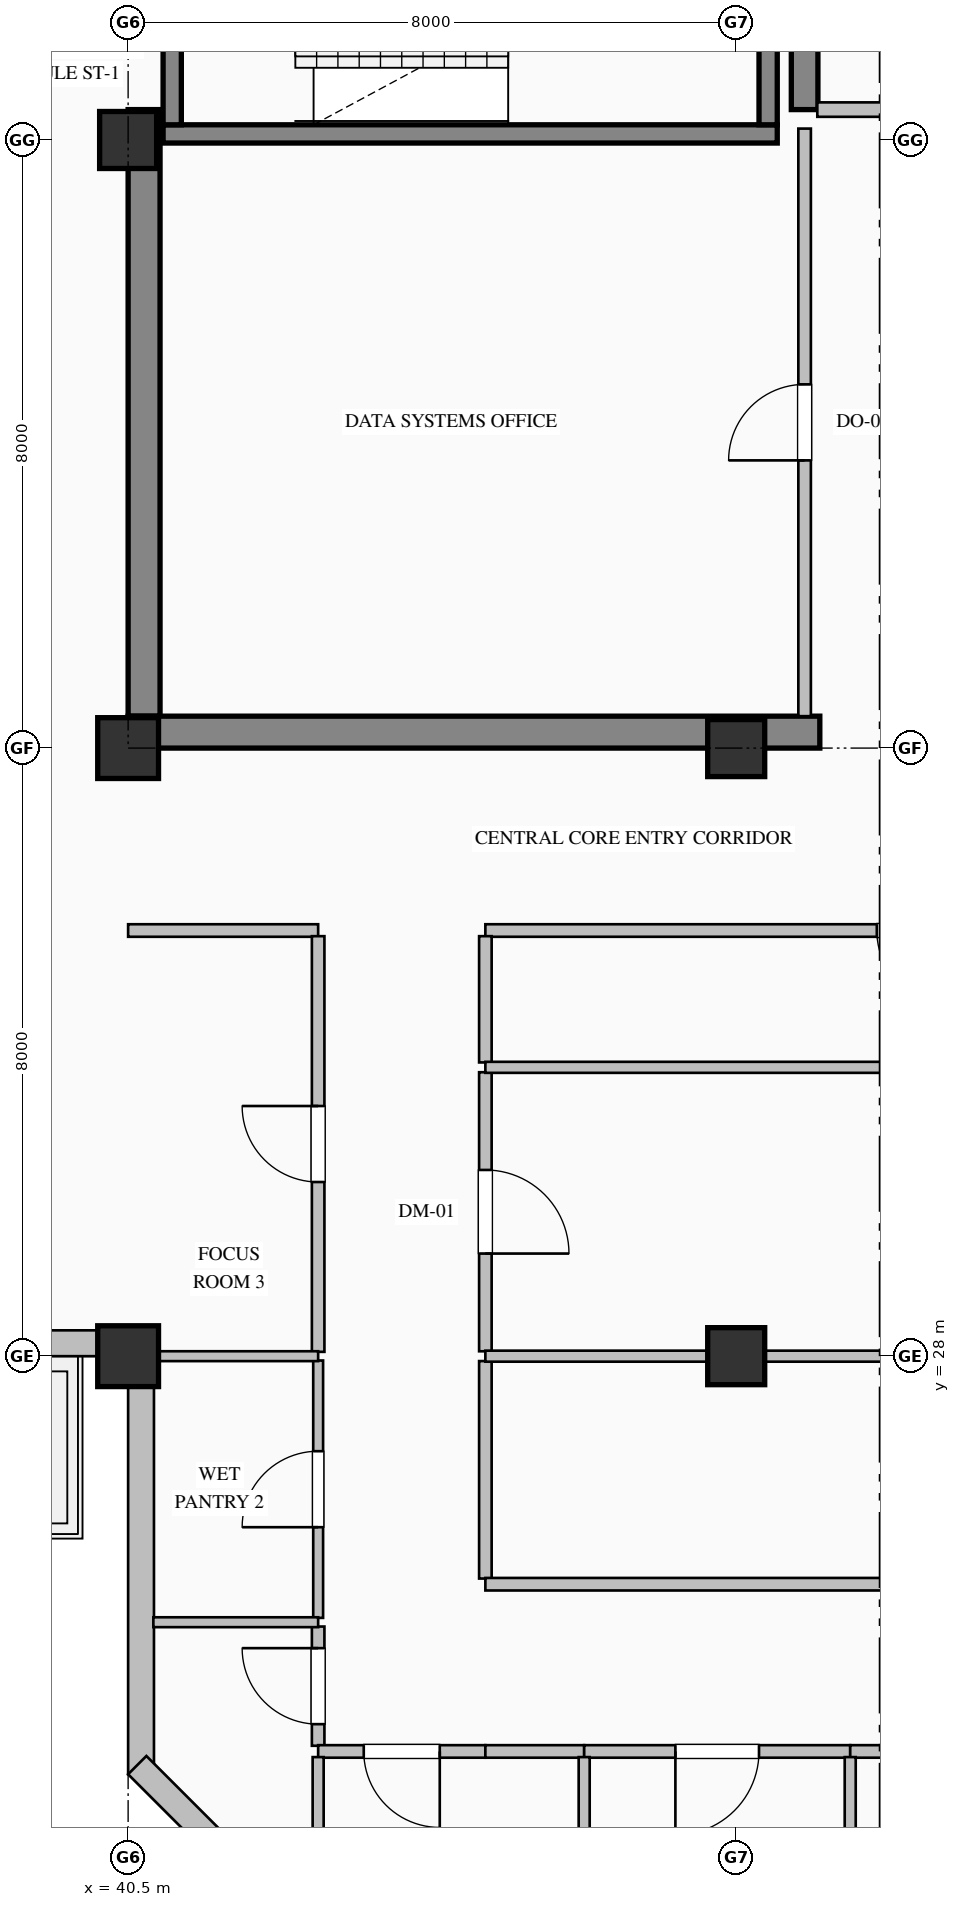
"""IFC4 building model, lengths in metres.
Left out: names, types, materials, properties, quantities, classifications, styles, units other than length and angle.
Written with IfcOpenShell. Run it as: python <this file> out.ifc"""

import sys

from ifc_helpers import new_model, si_unit, direction, frame, frame_2d, origin, origin_2d, place, context, subcontext, project, spatial, rectangle, hollow_rectangle, extrude, element, fill, save


model = new_model("IFC4")
c1 = context("Model", 3, precision=1e-05, world=origin(), true_north=direction((0.0, 1.0)))
c2 = subcontext(c1, "Body", "Model", "MODEL_VIEW")
j1 = project(units=[si_unit("LENGTHUNIT", "METRE"), si_unit("PLANEANGLEUNIT", "RADIAN")], contexts=[c1])
p1 = place(None, origin())
s1 = spatial("IfcSite", under=j1, at=p1, CompositionType="ELEMENT")
p2 = place(p1, origin())
s2 = spatial("IfcBuilding", under=s1, at=p2, CompositionType="ELEMENT")
p3 = place(p2, frame((0.0, 0.0, 291.2)))
s3 = spatial("IfcBuildingStorey", under=s2, at=p3, CompositionType="ELEMENT", Elevation=291.2)
p4 = place(p3, frame((40.71, 36.42, 0.0), z_axis=(0.0, 0.0, 1.0), x_axis=(0.0, 1.0, 0.0)))
e1 = element("IfcWall", 1, at=p4, inside=s3, PredefinedType="SHEAR", context=c2, shape_type="SweptSolid", body=[
    extrude(rectangle(XDim=7.98, YDim=0.42, at=frame_2d((3.99, 0.0))), origin(), (0.0, 0.0, 1.0), 3.785),
])
p5 = place(p3, frame((40.5, 36.21, 0.0), z_axis=(0.0, 0.0, 1.0), x_axis=(1.0, 0.0, 0.0)))
e2 = element("IfcWall", 2, at=p5, inside=s3, PredefinedType="SHEAR", context=c2, shape_type="SweptSolid", body=[
    extrude(rectangle(XDim=9.1, YDim=0.42, at=frame_2d((4.55, 0.0))), origin(), (0.0, 0.0, 1.0), 3.785),
])
p6 = place(p3, frame((49.4, 44.4, 0.0), z_axis=(0.0, 0.0, 1.0), x_axis=(0.0, 1.0, 0.0)))
e3 = element("IfcWall", 3, at=p6, inside=s3, PredefinedType="SHEAR", context=c2, shape_type="SweptSolid", body=[
    extrude(rectangle(XDim=3.0, YDim=0.35, at=frame_2d((1.5, 0.0))), origin(), (0.0, 0.0, 1.0), 3.785),
])
for number, where, z_axis, x_axis in (
    (4, (40.5, 28.0, 0.0), (0.0, 0.0, 1.0), (1.0, 0.0, 0.0)),
    (5, (40.5, 36.0, 0.0), (0.0, 0.0, 1.0), (1.0, 0.0, 0.0)),
):
    element("IfcColumn", number, at=place(p3, frame(where, z_axis=z_axis, x_axis=x_axis)), inside=s3, PredefinedType="COLUMN", context=c2, shape_type="SweptSolid", body=[
        extrude(hollow_rectangle(XDim=0.8, YDim=0.8, WallThickness=0.032, at=origin_2d()), origin(), (0.0, 0.0, 1.0), 4.0),
    ])
for number, where, z_axis, x_axis in (
    (6, (40.5, 44.0, 0.0), (0.0, 0.0, 1.0), (1.0, 0.0, 0.0)),
    (7, (48.5, 28.0, 0.0), (0.0, 0.0, 1.0), (1.0, 0.0, 0.0)),
    (8, (48.5, 36.0, 0.0), (0.0, 0.0, 1.0), (1.0, 0.0, 0.0)),
):
    element("IfcColumn", number, at=place(p3, frame(where, z_axis=z_axis, x_axis=x_axis)), inside=s3, PredefinedType="COLUMN", context=c2, shape_type="SweptSolid", body=[
        extrude(rectangle(XDim=0.75, YDim=0.75, at=origin_2d()), origin(), (0.0, 0.0, 1.0), 4.0),
    ])
p7 = place(p3, frame((40.67, 22.5, 0.0), z_axis=(0.0, 0.0, 1.0), x_axis=(0.0, 1.0, 0.0)))
e9 = element("IfcWall", 9, at=p7, inside=s3, PredefinedType="SOLIDWALL", context=c2, shape_type="SweptSolid", body=[
    extrude(rectangle(XDim=5.84, YDim=0.34, at=frame_2d((2.92, 0.0))), origin(), (0.0, 0.0, 1.0), 3.185),
])
p8 = place(p3, frame((40.52, 28.17, 0.0), z_axis=(0.0, 0.0, 1.0), x_axis=(-1.0, 0.0, 0.0)))
e10 = element("IfcWall", 10, at=p8, inside=s3, PredefinedType="SOLIDWALL", context=c2, shape_type="SweptSolid", body=[
    extrude(rectangle(XDim=20.02, YDim=0.34, at=frame_2d((10.01, 0.0))), origin(), (0.0, 0.0, 1.0), 3.185),
])
p9 = place(p8, frame((2.925, 0.0, 0.9)))
e11 = element("IfcOpeningElement", 11, at=p9, cuts=e10, PredefinedType="OPENING", context=c2, shape_type="SweptSolid", body=[
    extrude(rectangle(XDim=1.35, YDim=1.85, at=frame_2d((0.675, 0.925))), frame((0.0, 0.18, 0.0), z_axis=(0.0, -1.0, 0.0), x_axis=(1.0, 0.0, 0.0)), (0.0, 0.0, 1.0), 0.36),
])
p10 = place(p8, frame((13.725, 0.0, 0.9)))
e12 = element("IfcOpeningElement", 12, at=p10, cuts=e10, PredefinedType="OPENING", context=c2, shape_type="SweptSolid", body=[
    extrude(rectangle(XDim=1.35, YDim=1.85, at=frame_2d((0.675, 0.925))), frame((0.0, 0.18, 0.0), z_axis=(0.0, -1.0, 0.0), x_axis=(1.0, 0.0, 0.0)), (0.0, 0.0, 1.0), 0.36),
])
p11 = place(p8, frame((11.395, 0.0, 0.0)))
e13 = element("IfcOpeningElement", 13, at=p11, cuts=e10, PredefinedType="OPENING", context=c2, shape_type="SweptSolid", body=[
    extrude(rectangle(XDim=1.25, YDim=2.25, at=frame_2d((0.625, 1.125))), frame((0.0, 0.18, 0.0), z_axis=(0.0, -1.0, 0.0), x_axis=(1.0, 0.0, 0.0)), (0.0, 0.0, 1.0), 0.36),
])
p12 = place(p3, frame((44.62, 18.62, 0.0), z_axis=(0.0, 0.0, 1.0), x_axis=(-0.707106781187, 0.707106781187, 0.0)))
e14 = element("IfcWall", 14, at=p12, inside=s3, PredefinedType="SOLIDWALL", context=c2, shape_type="SweptSolid", body=[
    extrude(rectangle(XDim=5.657, YDim=0.34, at=frame_2d((2.828, 0.0))), origin(), (0.0, 0.0, 1.0), 3.785),
])
p13 = place(p3, frame((49.04, 44.08, 0.0), z_axis=(0.0, 0.0, 1.0), x_axis=(-1.0, 0.0, 0.0)))
e15 = element("IfcWall", 15, at=p13, inside=s3, PredefinedType="SOLIDWALL", context=c2, shape_type="SweptSolid", body=[
    extrude(rectangle(XDim=8.08, YDim=0.24, at=frame_2d((4.04, 0.0))), origin(), (0.0, 0.0, 1.0), 4.0),
])
p14 = place(p3, frame((41.08, 47.35, 0.0), z_axis=(0.0, 0.0, 1.0), x_axis=(0.0, -1.0, 0.0)))
e16 = element("IfcWall", 16, at=p14, inside=s3, PredefinedType="SOLIDWALL", context=c2, shape_type="SweptSolid", body=[
    extrude(rectangle(XDim=3.15, YDim=0.24, at=frame_2d((1.575, 0.0))), origin(), (0.0, 0.0, 1.0), 4.0),
])
p15 = place(p14, frame((1.0, 0.0, 0.0)))
e17 = element("IfcOpeningElement", 17, at=p15, cuts=e16, PredefinedType="OPENING", context=c2, shape_type="SweptSolid", body=[
    extrude(rectangle(XDim=1.15, YDim=2.2, at=frame_2d((0.575, 1.1))), frame((0.0, 0.13, 0.0), z_axis=(0.0, -1.0, 0.0), x_axis=(1.0, 0.0, 0.0)), (0.0, 0.0, 1.0), 0.26),
])
p16 = place(p3, frame((48.92, 44.2, 0.0), z_axis=(0.0, 0.0, 1.0), x_axis=(0.0, 1.0, 0.0)))
e18 = element("IfcWall", 18, at=p16, inside=s3, PredefinedType="SOLIDWALL", context=c2, shape_type="SweptSolid", body=[
    extrude(rectangle(XDim=3.15, YDim=0.24, at=frame_2d((1.575, 0.0))), origin(), (0.0, 0.0, 1.0), 4.0),
])
p17 = place(p3, frame((54.733, 44.4, 0.0), z_axis=(0.0, 0.0, 1.0), x_axis=(-1.0, 0.0, 0.0)))
e19 = element("IfcWall", 19, at=p17, inside=s3, PredefinedType="PARTITIONING", context=c2, shape_type="SweptSolid", body=[
    extrude(rectangle(XDim=5.166, YDim=0.19, at=frame_2d((2.583, 0.0))), origin(), (0.0, 0.0, 1.0), 3.785),
])
p18 = place(p17, frame((2.058, 0.0, 0.0)))
e20 = element("IfcOpeningElement", 20, at=p18, cuts=e19, PredefinedType="OPENING", context=c2, shape_type="SweptSolid", body=[
    extrude(rectangle(XDim=1.05, YDim=2.15, at=frame_2d((0.525, 1.075))), frame((0.0, 0.105, 0.0), z_axis=(0.0, -1.0, 0.0), x_axis=(1.0, 0.0, 0.0)), (0.0, 0.0, 1.0), 0.21),
])
p19 = place(p3, frame((49.4, 36.42, 0.0), z_axis=(0.0, 0.0, 1.0), x_axis=(0.0, 1.0, 0.0)))
e21 = element("IfcWall", 21, at=p19, inside=s3, PredefinedType="PARTITIONING", context=c2, shape_type="SweptSolid", body=[
    extrude(rectangle(XDim=7.73, YDim=0.165, at=frame_2d((3.865, 0.0))), origin(), (0.0, 0.0, 1.0), 3.027),
])
p20 = place(p19, frame((3.365, 0.0, 0.0)))
e22 = element("IfcOpeningElement", 22, at=p20, cuts=e21, PredefinedType="OPENING", context=c2, shape_type="SweptSolid", body=[
    extrude(rectangle(XDim=1.0, YDim=2.15, at=frame_2d((0.5, 1.075))), frame((0.0, 0.093, 0.0), z_axis=(0.0, -1.0, 0.0), x_axis=(1.0, 0.0, 0.0)), (0.0, 0.0, 1.0), 0.185),
])
p21 = place(p3, frame((56.5, 33.6, 0.0), z_axis=(0.0, 0.0, 1.0), x_axis=(-1.0, 0.0, 0.0)))
e23 = element("IfcWall", 23, at=p21, inside=s3, PredefinedType="PARTITIONING", context=c2, shape_type="SweptSolid", body=[
    extrude(rectangle(XDim=11.3, YDim=0.165, at=frame_2d((5.65, 0.0))), origin(), (0.0, 0.0, 1.0), 3.785),
])
p22 = place(p21, frame((5.15, 0.0, 0.0)))
e24 = element("IfcOpeningElement", 24, at=p22, cuts=e23, PredefinedType="OPENING", context=c2, shape_type="SweptSolid", body=[
    extrude(rectangle(XDim=1.0, YDim=2.15, at=frame_2d((0.5, 1.075))), frame((0.0, 0.093, 0.0), z_axis=(0.0, -1.0, 0.0), x_axis=(1.0, 0.0, 0.0)), (0.0, 0.0, 1.0), 0.185),
])
p23 = place(p3, frame((43.0, 33.6, 0.0), z_axis=(0.0, 0.0, 1.0), x_axis=(-1.0, 0.0, 0.0)))
e25 = element("IfcWall", 25, at=p23, inside=s3, PredefinedType="PARTITIONING", context=c2, shape_type="SweptSolid", body=[
    extrude(rectangle(XDim=2.5, YDim=0.165, at=frame_2d((1.25, 0.0))), origin(), (0.0, 0.0, 1.0), 3.785),
])
p24 = place(p3, frame((45.2, 27.936, 0.0), z_axis=(0.0, 0.0, 1.0), x_axis=(0.0, -1.0, 0.0)))
e26 = element("IfcWall", 26, at=p24, inside=s3, PredefinedType="PARTITIONING", context=c2, shape_type="SweptSolid", body=[
    extrude(rectangle(XDim=2.861, YDim=0.165, at=frame_2d((1.431, 0.0))), origin(), (0.0, 0.0, 1.0), 3.785),
])
p25 = place(p3, frame((45.2, 31.736, 0.0), z_axis=(0.0, 0.0, 1.0), x_axis=(0.0, -1.0, 0.0)))
e27 = element("IfcWall", 27, at=p25, inside=s3, PredefinedType="PARTITIONING", context=c2, shape_type="SweptSolid", body=[
    extrude(rectangle(XDim=3.671, YDim=0.165, at=frame_2d((1.835, 0.0))), origin(), (0.0, 0.0, 1.0), 3.785),
])
p26 = place(p25, frame((1.285, 0.0, 0.0)))
e28 = element("IfcOpeningElement", 28, at=p26, cuts=e27, PredefinedType="OPENING", context=c2, shape_type="SweptSolid", body=[
    extrude(rectangle(XDim=1.1, YDim=2.2, at=frame_2d((0.55, 1.1))), frame((0.0, 0.093, 0.0), z_axis=(0.0, -1.0, 0.0), x_axis=(1.0, 0.0, 0.0)), (0.0, 0.0, 1.0), 0.185),
])
p27 = place(p3, frame((45.2, 33.525, 0.0), z_axis=(0.0, 0.0, 1.0), x_axis=(0.0, -1.0, 0.0)))
e29 = element("IfcWall", 29, at=p27, inside=s3, PredefinedType="PARTITIONING", context=c2, shape_type="SweptSolid", body=[
    extrude(rectangle(XDim=1.661, YDim=0.165, at=frame_2d((0.831, 0.0))), origin(), (0.0, 0.0, 1.0), 3.785),
])
p28 = place(p3, frame((43.0, 22.875, 0.0), z_axis=(0.0, 0.0, 1.0), x_axis=(0.0, 1.0, 0.0)))
e30 = element("IfcWall", 30, at=p28, inside=s3, PredefinedType="PARTITIONING", context=c2, shape_type="SweptSolid", body=[
    extrude(rectangle(XDim=1.569, YDim=0.165, at=frame_2d((0.784, 0.0))), origin(), (0.0, 0.0, 1.0), 3.785),
])
p29 = place(p28, frame((0.284, 0.0, 0.0)))
e31 = element("IfcOpeningElement", 31, at=p29, cuts=e30, PredefinedType="OPENING", context=c2, shape_type="SweptSolid", body=[
    extrude(rectangle(XDim=1.0, YDim=2.15, at=frame_2d((0.5, 1.075))), frame((0.0, 0.093, 0.0), z_axis=(0.0, -1.0, 0.0), x_axis=(1.0, 0.0, 0.0)), (0.0, 0.0, 1.0), 0.185),
])
p30 = place(p3, frame((43.0, 24.557, 0.0), z_axis=(0.0, 0.0, 1.0), x_axis=(0.0, 1.0, 0.0)))
e32 = element("IfcWall", 32, at=p30, inside=s3, PredefinedType="PARTITIONING", context=c2, shape_type="SweptSolid", body=[
    extrude(rectangle(XDim=3.386, YDim=0.13, at=frame_2d((1.693, 0.0))), origin(), (0.0, 0.0, 1.0), 3.785),
])
p31 = place(p30, frame((1.193, 0.0, 0.0)))
e33 = element("IfcOpeningElement", 33, at=p31, cuts=e32, PredefinedType="OPENING", context=c2, shape_type="SweptSolid", body=[
    extrude(rectangle(XDim=1.0, YDim=2.15, at=frame_2d((0.5, 1.075))), frame((0.0, 0.075, 0.0), z_axis=(0.0, -1.0, 0.0), x_axis=(1.0, 0.0, 0.0)), (0.0, 0.0, 1.0), 0.15),
])
p32 = place(p3, frame((43.0, 28.057, 0.0), z_axis=(0.0, 0.0, 1.0), x_axis=(0.0, 1.0, 0.0)))
e34 = element("IfcWall", 34, at=p32, inside=s3, PredefinedType="PARTITIONING", context=c2, shape_type="SweptSolid", body=[
    extrude(rectangle(XDim=5.469, YDim=0.165, at=frame_2d((2.734, 0.0))), origin(), (0.0, 0.0, 1.0), 3.785),
])
p33 = place(p32, frame((2.234, 0.0, 0.0)))
e35 = element("IfcOpeningElement", 35, at=p33, cuts=e34, PredefinedType="OPENING", context=c2, shape_type="SweptSolid", body=[
    extrude(rectangle(XDim=1.0, YDim=2.15, at=frame_2d((0.5, 1.075))), frame((0.0, 0.093, 0.0), z_axis=(0.0, -1.0, 0.0), x_axis=(1.0, 0.0, 0.0)), (0.0, 0.0, 1.0), 0.185),
])
p34 = place(p3, frame((45.2, 22.8, 0.0), z_axis=(0.0, 0.0, 1.0), x_axis=(-1.0, 0.0, 0.0)))
e36 = element("IfcWall", 36, at=p34, inside=s3, PredefinedType="PARTITIONING", context=c2, shape_type="SweptSolid", body=[
    extrude(rectangle(XDim=2.2, YDim=0.165, at=frame_2d((1.1, 0.0))), origin(), (0.0, 0.0, 1.0), 3.785),
])
p35 = place(p34, frame((0.6, 0.0, 0.0)))
e37 = element("IfcOpeningElement", 37, at=p35, cuts=e36, PredefinedType="OPENING", context=c2, shape_type="SweptSolid", body=[
    extrude(rectangle(XDim=1.0, YDim=2.15, at=frame_2d((0.5, 1.075))), frame((0.0, 0.093, 0.0), z_axis=(0.0, -1.0, 0.0), x_axis=(1.0, 0.0, 0.0)), (0.0, 0.0, 1.0), 0.185),
])
p36 = place(p3, frame((45.2, 25.0, 0.0), z_axis=(0.0, 0.0, 1.0), x_axis=(1.0, 0.0, 0.0)))
e38 = element("IfcWall", 38, at=p36, inside=s3, PredefinedType="PARTITIONING", context=c2, shape_type="SweptSolid", body=[
    extrude(rectangle(XDim=16.3, YDim=0.165, at=frame_2d((8.15, 0.0))), origin(), (0.0, 0.0, 1.0), 3.785),
])
p37 = place(p36, frame((7.65, 0.0, 0.0)))
e39 = element("IfcOpeningElement", 39, at=p37, cuts=e38, PredefinedType="OPENING", context=c2, shape_type="SweptSolid", body=[
    extrude(rectangle(XDim=1.0, YDim=2.15, at=frame_2d((0.5, 1.075))), frame((0.0, 0.093, 0.0), z_axis=(0.0, -1.0, 0.0), x_axis=(1.0, 0.0, 0.0)), (0.0, 0.0, 1.0), 0.185),
])
p38 = place(p3, frame((46.5, 22.8, 0.0), z_axis=(0.0, 0.0, 1.0), x_axis=(-1.0, 0.0, 0.0)))
e40 = element("IfcWall", 40, at=p38, inside=s3, PredefinedType="PARTITIONING", context=c2, shape_type="SweptSolid", body=[
    extrude(rectangle(XDim=1.3, YDim=0.165, at=frame_2d((0.65, 0.0))), origin(), (0.0, 0.0, 1.0), 3.785),
])
p39 = place(p3, frame((50.0, 22.8, 0.0), z_axis=(0.0, 0.0, 1.0), x_axis=(-1.0, 0.0, 0.0)))
e41 = element("IfcWall", 41, at=p39, inside=s3, PredefinedType="PARTITIONING", context=c2, shape_type="SweptSolid", body=[
    extrude(rectangle(XDim=3.5, YDim=0.165, at=frame_2d((1.75, 0.0))), origin(), (0.0, 0.0, 1.0), 3.785),
])
p40 = place(p39, frame((1.2, 0.0, 0.0)))
e42 = element("IfcOpeningElement", 42, at=p40, cuts=e41, PredefinedType="OPENING", context=c2, shape_type="SweptSolid", body=[
    extrude(rectangle(XDim=1.1, YDim=2.2, at=frame_2d((0.55, 1.1))), frame((0.0, 0.093, 0.0), z_axis=(0.0, -1.0, 0.0), x_axis=(1.0, 0.0, 0.0)), (0.0, 0.0, 1.0), 0.185),
])
p41 = place(p3, frame((53.5, 22.8, 0.0), z_axis=(0.0, 0.0, 1.0), x_axis=(-1.0, 0.0, 0.0)))
e43 = element("IfcWall", 43, at=p41, inside=s3, PredefinedType="PARTITIONING", context=c2, shape_type="SweptSolid", body=[
    extrude(rectangle(XDim=3.5, YDim=0.165, at=frame_2d((1.75, 0.0))), origin(), (0.0, 0.0, 1.0), 3.785),
])
p42 = place(p41, frame((1.25, 0.0, 0.0)))
e44 = element("IfcOpeningElement", 44, at=p42, cuts=e43, PredefinedType="OPENING", context=c2, shape_type="SweptSolid", body=[
    extrude(rectangle(XDim=1.0, YDim=2.15, at=frame_2d((0.5, 1.075))), frame((0.0, 0.093, 0.0), z_axis=(0.0, -1.0, 0.0), x_axis=(1.0, 0.0, 0.0)), (0.0, 0.0, 1.0), 0.185),
])
p43 = place(p3, frame((45.2, 28.0, 0.0), z_axis=(0.0, 0.0, 1.0), x_axis=(1.0, 0.0, 0.0)))
e45 = element("IfcWall", 45, at=p43, inside=s3, PredefinedType="PARTITIONING", context=c2, shape_type="SweptSolid", body=[
    extrude(rectangle(XDim=18.528, YDim=0.145, at=frame_2d((9.264, 0.0))), origin(), (0.0, 0.0, 1.0), 3.177),
])
p44 = place(p3, frame((45.2, 31.8, 0.0), z_axis=(0.0, 0.0, 1.0), x_axis=(1.0, 0.0, 0.0)))
e46 = element("IfcWall", 46, at=p44, inside=s3, PredefinedType="PARTITIONING", context=c2, shape_type="SweptSolid", body=[
    extrude(rectangle(XDim=18.528, YDim=0.145, at=frame_2d((9.264, 0.0))), origin(), (0.0, 0.0, 1.0), 3.785),
])
p45 = place(p3, frame((40.832, 24.5, 0.0), z_axis=(0.0, 0.0, 1.0), x_axis=(1.0, 0.0, 0.0)))
e47 = element("IfcWall", 47, at=p45, inside=s3, PredefinedType="PARTITIONING", context=c2, shape_type="SweptSolid", body=[
    extrude(rectangle(XDim=2.168, YDim=0.13, at=frame_2d((1.084, 0.0))), origin(), (0.0, 0.0, 1.0), 3.785),
])
p46 = place(p3, frame((43.0, 22.726, 0.0), z_axis=(0.0, 0.0, 1.0), x_axis=(0.0, -1.0, 0.0)))
e48 = element("IfcWall", 48, at=p46, inside=s3, PredefinedType="PARTITIONING", context=c2, shape_type="SweptSolid", body=[
    extrude(rectangle(XDim=2.256, YDim=0.145, at=frame_2d((1.128, 0.0))), origin(), (0.0, 0.0, 1.0), 3.785),
])
p47 = place(p3, frame((40.832, 28.0, 0.0), z_axis=(0.0, 0.0, 1.0), x_axis=(1.0, 0.0, 0.0)))
e49 = element("IfcWall", 49, at=p47, inside=s3, PredefinedType="PARTITIONING", context=c2, shape_type="SweptSolid", body=[
    extrude(rectangle(XDim=2.168, YDim=0.13, at=frame_2d((1.084, 0.0))), origin(), (0.0, 0.0, 1.0), 3.177),
])
for number, where, z_axis, x_axis in (
    (50, (46.5, 22.726, 0.0), (0.0, 0.0, 1.0), (0.0, -1.0, 0.0)),
    (51, (50.0, 22.726, 0.0), (0.0, 0.0, 1.0), (0.0, -1.0, 0.0)),
):
    element("IfcWall", number, at=place(p3, frame(where, z_axis=z_axis, x_axis=x_axis)), inside=s3, PredefinedType="PARTITIONING", context=c2, shape_type="SweptSolid", body=[
        extrude(rectangle(XDim=3.894, YDim=0.145, at=frame_2d((1.947, 0.0))), origin(), (0.0, 0.0, 1.0), 3.785),
    ])
p48 = place(p20, origin())
e52 = element("IfcDoor", 52, at=p48, inside=s3, OperationType="SINGLE_SWING_LEFT", PredefinedType="DOOR", context=c2, shape_type="SweptSolid", body=[
    extrude(rectangle(XDim=1.0, YDim=2.15, at=frame_2d((0.5, 1.075))), frame((0.0, 0.025, 0.0), z_axis=(0.0, -1.0, 0.0), x_axis=(1.0, 0.0, 0.0)), (0.0, 0.0, 1.0), 0.05),
])
fill(e22, e52)
p49 = place(p26, origin())
e53 = element("IfcDoor", 53, at=p49, inside=s3, OperationType="SINGLE_SWING_RIGHT", PredefinedType="DOOR", context=c2, shape_type="SweptSolid", body=[
    extrude(rectangle(XDim=1.1, YDim=2.2, at=frame_2d((0.55, 1.1))), frame((0.0, 0.025, 0.0), z_axis=(0.0, -1.0, 0.0), x_axis=(1.0, 0.0, 0.0)), (0.0, 0.0, 1.0), 0.05),
])
fill(e28, e53)
p50 = place(p22, origin())
e54 = element("IfcDoor", 54, at=p50, inside=s3, OperationType="SINGLE_SWING_LEFT", PredefinedType="DOOR", context=c2, shape_type="SweptSolid", body=[
    extrude(rectangle(XDim=1.0, YDim=2.15, at=frame_2d((0.5, 1.075))), frame((0.0, 0.025, 0.0), z_axis=(0.0, -1.0, 0.0), x_axis=(1.0, 0.0, 0.0)), (0.0, 0.0, 1.0), 0.05),
])
fill(e24, e54)
p51 = place(p29, origin())
e55 = element("IfcDoor", 55, at=p51, inside=s3, OperationType="SINGLE_SWING_RIGHT", PredefinedType="DOOR", context=c2, shape_type="SweptSolid", body=[
    extrude(rectangle(XDim=1.0, YDim=2.15, at=frame_2d((0.5, 1.075))), frame((0.0, 0.025, 0.0), z_axis=(0.0, -1.0, 0.0), x_axis=(1.0, 0.0, 0.0)), (0.0, 0.0, 1.0), 0.05),
])
fill(e31, e55)
p52 = place(p31, origin())
e56 = element("IfcDoor", 56, at=p52, inside=s3, OperationType="SINGLE_SWING_LEFT", PredefinedType="DOOR", context=c2, shape_type="SweptSolid", body=[
    extrude(rectangle(XDim=1.0, YDim=2.15, at=frame_2d((0.5, 1.075))), frame((0.0, 0.025, 0.0), z_axis=(0.0, -1.0, 0.0), x_axis=(1.0, 0.0, 0.0)), (0.0, 0.0, 1.0), 0.05),
])
fill(e33, e56)
p53 = place(p33, origin())
e57 = element("IfcDoor", 57, at=p53, inside=s3, OperationType="SINGLE_SWING_RIGHT", PredefinedType="DOOR", context=c2, shape_type="SweptSolid", body=[
    extrude(rectangle(XDim=1.0, YDim=2.15, at=frame_2d((0.5, 1.075))), frame((0.0, 0.025, 0.0), z_axis=(0.0, -1.0, 0.0), x_axis=(1.0, 0.0, 0.0)), (0.0, 0.0, 1.0), 0.05),
])
fill(e35, e57)
p54 = place(p35, origin())
e58 = element("IfcDoor", 58, at=p54, inside=s3, OperationType="SINGLE_SWING_LEFT", PredefinedType="DOOR", context=c2, shape_type="SweptSolid", body=[
    extrude(rectangle(XDim=1.0, YDim=2.15, at=frame_2d((0.5, 1.075))), frame((0.0, 0.025, 0.0), z_axis=(0.0, -1.0, 0.0), x_axis=(1.0, 0.0, 0.0)), (0.0, 0.0, 1.0), 0.05),
])
fill(e37, e58)
p55 = place(p40, origin())
e59 = element("IfcDoor", 59, at=p55, inside=s3, OperationType="SINGLE_SWING_RIGHT", PredefinedType="DOOR", context=c2, shape_type="SweptSolid", body=[
    extrude(rectangle(XDim=1.1, YDim=2.2, at=frame_2d((0.55, 1.1))), frame((0.0, 0.025, 0.0), z_axis=(0.0, -1.0, 0.0), x_axis=(1.0, 0.0, 0.0)), (0.0, 0.0, 1.0), 0.05),
])
fill(e42, e59)
save(model, sys.argv[1])
